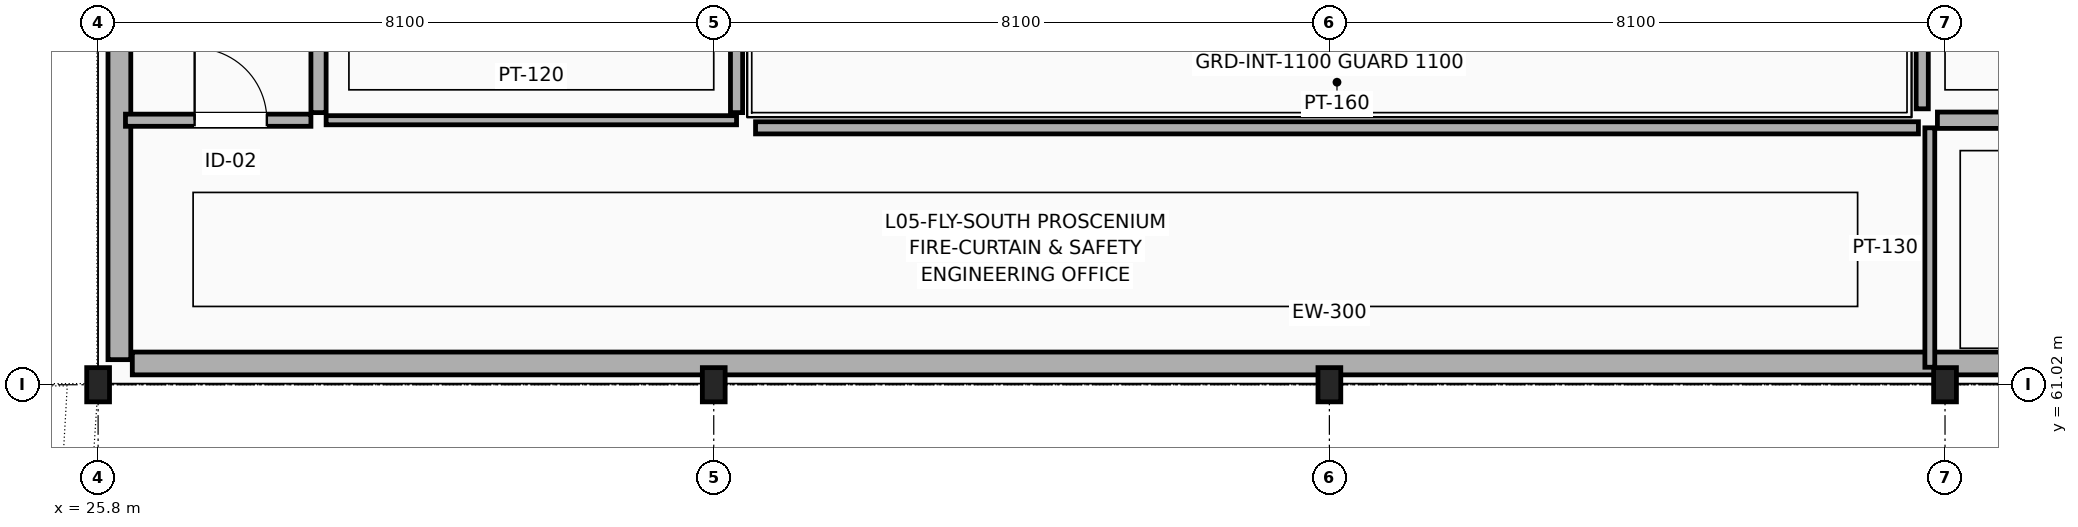
"""IFC4 building model, lengths in metres.
Left out: names, types, materials, properties, quantities, classifications, styles, units other than length and angle.
Written with IfcOpenShell. Run it as: python <this file> out.ifc"""

import sys

from ifc_helpers import new_model, si_unit, direction, frame, frame_2d, origin, origin_2d, place, context, subcontext, project, spatial, rectangle, i_section, extrude, element, fill, save


model = new_model("IFC4")
c1 = context("Model", 3, precision=1e-05, world=origin(), true_north=direction((0.0, 1.0)))
c2 = subcontext(c1, "Body", "Model", "MODEL_VIEW")
j1 = project(units=[si_unit("LENGTHUNIT", "METRE"), si_unit("PLANEANGLEUNIT", "RADIAN")], contexts=[c1])
p1 = place(None, origin())
s1 = spatial("IfcSite", under=j1, at=p1, CompositionType="ELEMENT")
p2 = place(p1, origin())
s2 = spatial("IfcBuilding", under=s1, at=p2, CompositionType="ELEMENT")
p3 = place(p2, frame((0.0, 0.0, 23.4)))
s3 = spatial("IfcBuildingStorey", under=s2, at=p3, CompositionType="ELEMENT", Elevation=23.4)
for number, where, z_axis, x_axis in (
    (1, (25.8, 61.02, 0.0), (0.0, 0.0, 1.0), (1.0, 0.0, 0.0)),
    (2, (33.9, 61.02, 0.0), (0.0, 0.0, 1.0), (1.0, 0.0, 0.0)),
    (3, (42.0, 61.02, 0.0), (0.0, 0.0, 1.0), (1.0, 0.0, 0.0)),
    (4, (50.1, 61.02, 0.0), (0.0, 0.0, 1.0), (1.0, 0.0, 0.0)),
):
    element("IfcColumn", number, at=place(p3, frame(where, z_axis=z_axis, x_axis=x_axis)), inside=s3, PredefinedType="COLUMN", context=c2, shape_type="SweptSolid", body=[
        extrude(i_section(OverallWidth=0.3, OverallDepth=0.45, WebThickness=0.014, FlangeThickness=0.026, FilletRadius=0.027, at=origin_2d()), origin(), (0.0, 0.0, 1.0), 4.2),
    ])
p4 = place(p3, frame((26.08, 61.35, 0.0), z_axis=(0.0, 0.0, 1.0), x_axis=(0.0, 1.0, 0.0)))
e5 = element("IfcWall", 5, at=p4, inside=s3, PredefinedType="SOLIDWALL", context=c2, shape_type="SweptSolid", body=[
    extrude(rectangle(XDim=17.95, YDim=0.3, at=frame_2d((8.975, 0.0))), origin(), (0.0, 0.0, 1.0), 3.36),
])
p5 = place(p3, frame((26.25, 61.3, 0.0), z_axis=(0.0, 0.0, 1.0), x_axis=(1.0, 0.0, 0.0)))
e6 = element("IfcWall", 6, at=p5, inside=s3, PredefinedType="SOLIDWALL", context=c2, shape_type="SweptSolid", body=[
    extrude(rectangle(XDim=31.5, YDim=0.3, at=frame_2d((15.75, 0.0))), origin(), (0.0, 0.0, 1.0), 3.36),
])
p6 = place(p3, frame((28.7, 64.6, 0.0), z_axis=(0.0, 0.0, 1.0), x_axis=(0.0, 1.0, 0.0)))
e7 = element("IfcWall", 7, at=p6, inside=s3, PredefinedType="PARTITIONING", context=c2, shape_type="SweptSolid", body=[
    extrude(rectangle(XDim=10.7, YDim=0.2, at=frame_2d((5.35, 0.0))), origin(), (0.0, 0.0, 1.0), 3.96),
])
p7 = place(p6, frame((7.172, 0.0, 0.0)))
e8 = element("IfcOpeningElement", 8, at=p7, cuts=e7, PredefinedType="OPENING", context=c2, shape_type="SweptSolid", body=[
    extrude(rectangle(XDim=0.95, YDim=2.15, at=frame_2d((0.475, 1.075))), frame((0.0, 0.11, 0.0), z_axis=(0.0, -1.0, 0.0), x_axis=(1.0, 0.0, 0.0)), (0.0, 0.0, 1.0), 0.22),
])
p8 = place(p3, frame((26.16, 64.5, 0.0), z_axis=(0.0, 0.0, 1.0), x_axis=(1.0, 0.0, 0.0)))
e9 = element("IfcWall", 9, at=p8, inside=s3, PredefinedType="PARTITIONING", context=c2, shape_type="SweptSolid", body=[
    extrude(rectangle(XDim=2.44, YDim=0.16, at=frame_2d((1.22, 0.0))), origin(), (0.0, 0.0, 1.0), 3.96),
])
p9 = place(p8, frame((0.91, 0.0, 0.0)))
e10 = element("IfcOpeningElement", 10, at=p9, cuts=e9, PredefinedType="OPENING", context=c2, shape_type="SweptSolid", body=[
    extrude(rectangle(XDim=0.95, YDim=2.15, at=frame_2d((0.475, 1.075))), frame((0.0, 0.09, 0.0), z_axis=(0.0, -1.0, 0.0), x_axis=(1.0, 0.0, 0.0)), (0.0, 0.0, 1.0), 0.18),
])
p10 = place(p3, frame((28.8, 64.5, 0.0), z_axis=(0.0, 0.0, 1.0), x_axis=(1.0, 0.0, 0.0)))
e11 = element("IfcWall", 11, at=p10, inside=s3, PredefinedType="PARTITIONING", context=c2, shape_type="SweptSolid", body=[
    extrude(rectangle(XDim=5.4, YDim=0.12, at=frame_2d((2.7, 0.0))), origin(), (0.0, 0.0, 1.0), 3.96),
])
p11 = place(p3, frame((50.0, 64.5, 0.0), z_axis=(0.0, 0.0, 1.0), x_axis=(1.0, 0.0, 0.0)))
e12 = element("IfcWall", 12, at=p11, inside=s3, PredefinedType="PARTITIONING", context=c2, shape_type="SweptSolid", body=[
    extrude(rectangle(XDim=5.2, YDim=0.215, at=frame_2d((2.6, 0.0))), origin(), (0.0, 0.0, 1.0), 3.96),
])
p12 = place(p3, frame((49.9, 61.25, 0.0), z_axis=(0.0, 0.0, 1.0), x_axis=(0.0, 1.0, 0.0)))
e13 = element("IfcWall", 13, at=p12, inside=s3, PredefinedType="PARTITIONING", context=c2, shape_type="SweptSolid", body=[
    extrude(rectangle(XDim=3.15, YDim=0.13, at=frame_2d((1.575, 0.0))), origin(), (0.0, 0.0, 1.0), 3.96),
])
p13 = place(p3, frame((34.2, 64.6, 0.0), z_axis=(0.0, 0.0, 1.0), x_axis=(0.0, 1.0, 0.0)))
e14 = element("IfcWall", 14, at=p13, inside=s3, PredefinedType="PARTITIONING", context=c2, shape_type="SweptSolid", body=[
    extrude(rectangle(XDim=8.15, YDim=0.16, at=frame_2d((4.075, 0.0))), origin(), (0.0, 0.0, 1.0), 3.96),
])
p14 = place(p3, frame((49.8, 64.65, 0.0), z_axis=(0.0, 0.0, 1.0), x_axis=(0.0, 1.0, 0.0)))
e15 = element("IfcWall", 15, at=p14, inside=s3, PredefinedType="PARTITIONING", context=c2, shape_type="SweptSolid", body=[
    extrude(rectangle(XDim=8.1, YDim=0.16, at=frame_2d((4.05, 0.0))), origin(), (0.0, 0.0, 1.0), 3.96),
])
p15 = place(p3, frame((34.45, 64.4, 0.0), z_axis=(0.0, 0.0, 1.0), x_axis=(1.0, 0.0, 0.0)))
e16 = element("IfcWall", 16, at=p15, inside=s3, PredefinedType="PARTITIONING", context=c2, shape_type="SweptSolid", body=[
    extrude(rectangle(XDim=15.3, YDim=0.16, at=frame_2d((7.65, 0.0))), origin(), (0.0, 0.0, 1.0), 3.96),
])
p16 = place(p9, origin())
e17 = element("IfcDoor", 17, at=p16, inside=s3, OperationType="SINGLE_SWING_LEFT", PredefinedType="DOOR", context=c2, shape_type="SweptSolid", body=[
    extrude(rectangle(XDim=0.95, YDim=2.15, at=frame_2d((0.475, 1.075))), frame((0.0, 0.025, 0.0), z_axis=(0.0, -1.0, 0.0), x_axis=(1.0, 0.0, 0.0)), (0.0, 0.0, 1.0), 0.05),
])
fill(e10, e17)
save(model, sys.argv[1])
